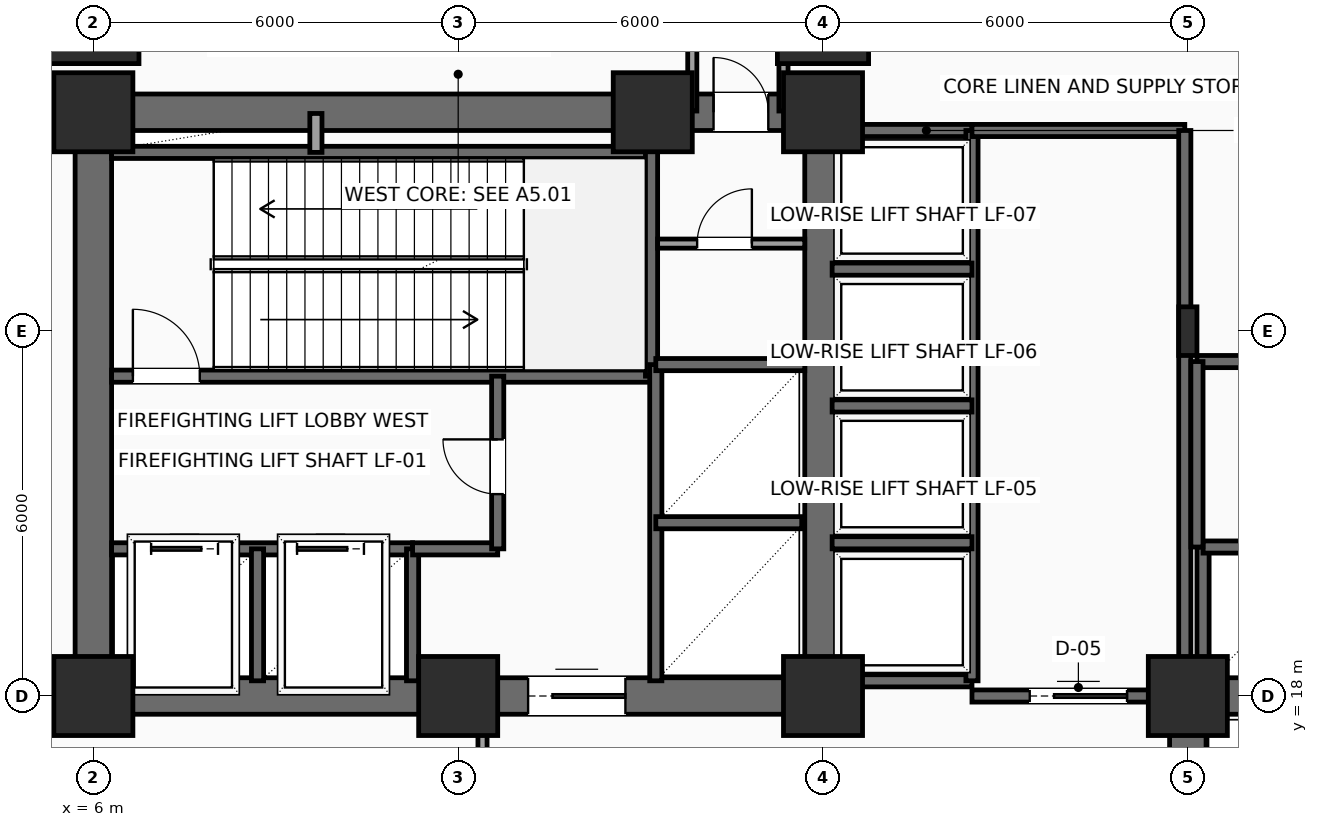
"""IFC4 building model, lengths in metres.
Left out: names, types, materials, properties, quantities, classifications, styles, units other than length and angle.
Written with IfcOpenShell. Run it as: python <this file> out.ifc"""

import sys

from ifc_helpers import new_model, si_unit, direction, frame, frame_2d, origin, origin_2d, place, context, subcontext, project, spatial, rectangle, i_section, extrude, element, fill, save


model = new_model("IFC4")
c1 = context("Model", 3, precision=1e-05, world=origin(), true_north=direction((0.0, 1.0)))
c2 = subcontext(c1, "Body", "Model", "MODEL_VIEW")
j1 = project(units=[si_unit("LENGTHUNIT", "METRE"), si_unit("PLANEANGLEUNIT", "RADIAN")], contexts=[c1])
p1 = place(None, origin())
s1 = spatial("IfcSite", under=j1, at=p1, CompositionType="ELEMENT")
p2 = place(p1, origin())
s2 = spatial("IfcBuilding", under=s1, at=p2, CompositionType="ELEMENT")
p3 = place(p2, frame((0.0, 0.0, 11.1)))
s3 = spatial("IfcBuildingStorey", under=s2, at=p3, CompositionType="ELEMENT", Elevation=11.1)
for number, where, z_axis, x_axis in (
    (1, (6.0, 18.0, 0.0), (0.0, 0.0, 1.0), (1.0, 0.0, 0.0)),
    (2, (12.0, 18.0, 0.0), (0.0, 0.0, 1.0), (1.0, 0.0, 0.0)),
    (3, (18.0, 18.0, 0.0), (0.0, 0.0, 1.0), (1.0, 0.0, 0.0)),
    (4, (6.0, 27.6, 0.0), (0.0, 0.0, 1.0), (1.0, 0.0, 0.0)),
    (5, (15.2, 27.6, 0.0), (0.0, 0.0, 1.0), (1.0, 0.0, 0.0)),
    (6, (18.0, 27.6, 0.0), (0.0, 0.0, 1.0), (1.0, 0.0, 0.0)),
    (7, (24.0, 18.0, 0.0), (0.0, 0.0, 1.0), (1.0, 0.0, 0.0)),
):
    element("IfcColumn", number, at=place(p3, frame(where, z_axis=z_axis, x_axis=x_axis)), inside=s3, PredefinedType="COLUMN", context=c2, shape_type="SweptSolid", body=[
        extrude(rectangle(XDim=1.3, YDim=1.3, at=origin_2d()), origin(), (0.0, 0.0, 1.0), 5.4),
    ])
for number, where, z_axis, x_axis in (
    (8, (6.0, 29.15, 0.0), (0.0, 0.0, 1.0), (1.0, 0.0, 0.0)),
    (9, (18.0, 29.15, 0.0), (0.0, 0.0, 1.0), (1.0, 0.0, 0.0)),
):
    element("IfcColumn", number, at=place(p3, frame(where, z_axis=z_axis, x_axis=x_axis)), inside=s3, PredefinedType="COLUMN", context=c2, shape_type="SweptSolid", body=[
        extrude(rectangle(XDim=1.5, YDim=1.5, at=origin_2d()), origin(), (0.0, 0.0, 1.0), 5.4),
    ])
p4 = place(p3, frame((24.0, 24.0, 0.0), z_axis=(0.0, 0.0, 1.0), x_axis=(1.0, 0.0, 0.0)))
e10 = element("IfcColumn", 10, at=p4, inside=s3, PredefinedType="COLUMN", context=c2, shape_type="SweptSolid", body=[
    extrude(i_section(OverallWidth=0.3, OverallDepth=0.8, WebThickness=0.018, FlangeThickness=0.033, FilletRadius=0.03, at=origin_2d()), origin(), (0.0, 0.0, 1.0), 5.4),
])
p5 = place(p3, frame((6.0, 18.0, 0.0), z_axis=(0.0, 0.0, 1.0), x_axis=(1.0, 0.0, 0.0)))
e11 = element("IfcWall", 11, at=p5, inside=s3, PredefinedType="SHEAR", context=c2, shape_type="SweptSolid", body=[
    extrude(rectangle(XDim=12.0, YDim=0.6, at=frame_2d((6.0, 0.0))), origin(), (0.0, 0.0, 1.0), 5.1),
])
p6 = place(p5, frame((7.15, 0.0, 0.0)))
e12 = element("IfcOpeningElement", 12, at=p6, cuts=e11, PredefinedType="OPENING", context=c2, shape_type="SweptSolid", body=[
    extrude(rectangle(XDim=1.6, YDim=2.3, at=frame_2d((0.8, 1.15))), frame((0.0, 0.31, 0.0), z_axis=(0.0, -1.0, 0.0), x_axis=(1.0, 0.0, 0.0)), (0.0, 0.0, 1.0), 0.62),
])
p7 = place(p3, frame((6.0, 27.6, 0.0), z_axis=(0.0, 0.0, 1.0), x_axis=(1.0, 0.0, 0.0)))
e13 = element("IfcWall", 13, at=p7, inside=s3, PredefinedType="SHEAR", context=c2, shape_type="SweptSolid", body=[
    extrude(rectangle(XDim=12.0, YDim=0.6, at=frame_2d((6.0, 0.0))), origin(), (0.0, 0.0, 1.0), 5.1),
])
p8 = place(p7, frame((10.2, 0.0, 0.0)))
e14 = element("IfcOpeningElement", 14, at=p8, cuts=e13, PredefinedType="OPENING", context=c2, shape_type="SweptSolid", body=[
    extrude(rectangle(XDim=0.9, YDim=2.15, at=frame_2d((0.45, 1.075))), frame((0.0, 0.31, 0.0), z_axis=(0.0, -1.0, 0.0), x_axis=(1.0, 0.0, 0.0)), (0.0, 0.0, 1.0), 0.62),
])
for number, where, z_axis, x_axis in (
    (15, (6.0, 18.0, 0.0), (0.0, 0.0, 1.0), (0.0, 1.0, 0.0)),
    (16, (18.0, 18.0, 0.0), (0.0, 0.0, 1.0), (0.0, 1.0, 0.0)),
    (17, (24.0, 18.0, 0.0), (0.0, 0.0, 1.0), (1.0, 0.0, 0.0)),
):
    element("IfcWall", number, at=place(p3, frame(where, z_axis=z_axis, x_axis=x_axis)), inside=s3, PredefinedType="SHEAR", context=c2, shape_type="SweptSolid", body=[
        extrude(rectangle(XDim=9.6, YDim=0.6, at=frame_2d((4.8, 0.0))), origin(), (0.0, 0.0, 1.0), 5.1),
    ])
p9 = place(p3, frame((24.0, 6.0, 0.0), z_axis=(0.0, 0.0, 1.0), x_axis=(0.0, 1.0, 0.0)))
e18 = element("IfcWall", 18, at=p9, inside=s3, PredefinedType="SHEAR", context=c2, shape_type="SweptSolid", body=[
    extrude(rectangle(XDim=12.0, YDim=0.6, at=frame_2d((6.0, 0.0))), origin(), (0.0, 0.0, 1.0), 5.1),
])
p10 = place(p9, frame((7.15, 0.0, 0.0)))
e19 = element("IfcOpeningElement", 19, at=p10, cuts=e18, PredefinedType="OPENING", context=c2, shape_type="SweptSolid", body=[
    extrude(rectangle(XDim=1.6, YDim=2.3, at=frame_2d((0.8, 1.15))), frame((0.0, 0.31, 0.0), z_axis=(0.0, -1.0, 0.0), x_axis=(1.0, 0.0, 0.0)), (0.0, 0.0, 1.0), 0.62),
])
p11 = place(p3, frame((6.3, 23.26, 0.0), z_axis=(0.0, 0.0, 1.0), x_axis=(1.0, 0.0, 0.0)))
e20 = element("IfcWall", 20, at=p11, inside=s3, PredefinedType="SHEAR", context=c2, shape_type="SweptSolid", body=[
    extrude(rectangle(XDim=8.88, YDim=0.2, at=frame_2d((4.44, 0.0))), origin(), (0.0, 0.0, 1.0), 5.1),
])
p12 = place(p11, frame((0.35, 0.0, 0.0)))
e21 = element("IfcOpeningElement", 21, at=p12, cuts=e20, PredefinedType="OPENING", context=c2, shape_type="SweptSolid", body=[
    extrude(rectangle(XDim=1.1, YDim=2.2, at=frame_2d((0.55, 1.1))), frame((0.0, 0.11, 0.0), z_axis=(0.0, -1.0, 0.0), x_axis=(1.0, 0.0, 0.0)), (0.0, 0.0, 1.0), 0.22),
])
p13 = place(p3, frame((6.3, 26.94, 0.0), z_axis=(0.0, 0.0, 1.0), x_axis=(1.0, 0.0, 0.0)))
e22 = element("IfcWall", 22, at=p13, inside=s3, PredefinedType="SHEAR", context=c2, shape_type="SweptSolid", body=[
    extrude(rectangle(XDim=8.88, YDim=0.2, at=frame_2d((4.44, 0.0))), origin(), (0.0, 0.0, 1.0), 5.1),
])
p14 = place(p3, frame((15.18, 23.26, 0.0), z_axis=(0.0, 0.0, 1.0), x_axis=(0.0, 1.0, 0.0)))
e23 = element("IfcWall", 23, at=p14, inside=s3, PredefinedType="SHEAR", context=c2, shape_type="SweptSolid", body=[
    extrude(rectangle(XDim=4.04, YDim=0.2, at=frame_2d((2.02, 0.0))), origin(), (0.0, 0.0, 1.0), 5.1),
])
p15 = place(p3, frame((6.3, 20.42, 0.0), z_axis=(0.0, 0.0, 1.0), x_axis=(1.0, 0.0, 0.0)))
e24 = element("IfcWall", 24, at=p15, inside=s3, PredefinedType="SHEAR", context=c2, shape_type="SweptSolid", body=[
    extrude(rectangle(XDim=4.95, YDim=0.2, at=frame_2d((2.475, 0.0))), origin(), (0.0, 0.0, 1.0), 5.1),
])
p16 = place(p15, frame((0.65, 0.0, 0.0)))
e25 = element("IfcOpeningElement", 25, at=p16, cuts=e24, PredefinedType="OPENING", context=c2, shape_type="SweptSolid", body=[
    extrude(rectangle(XDim=1.1, YDim=2.2, at=frame_2d((0.55, 1.1))), frame((0.0, 0.11, 0.0), z_axis=(0.0, -1.0, 0.0), x_axis=(1.0, 0.0, 0.0)), (0.0, 0.0, 1.0), 0.22),
])
p17 = place(p15, frame((3.05, 0.0, 0.0)))
e26 = element("IfcOpeningElement", 26, at=p17, cuts=e24, PredefinedType="OPENING", context=c2, shape_type="SweptSolid", body=[
    extrude(rectangle(XDim=1.1, YDim=2.2, at=frame_2d((0.55, 1.1))), frame((0.0, 0.11, 0.0), z_axis=(0.0, -1.0, 0.0), x_axis=(1.0, 0.0, 0.0)), (0.0, 0.0, 1.0), 0.22),
])
for number, where, z_axis, x_axis in (
    (27, (8.7, 18.25, 0.0), (0.0, 0.0, 1.0), (0.0, 1.0, 0.0)),
    (28, (11.25, 18.25, 0.0), (0.0, 0.0, 1.0), (0.0, 1.0, 0.0)),
):
    element("IfcWall", number, at=place(p3, frame(where, z_axis=z_axis, x_axis=x_axis)), inside=s3, PredefinedType="SHEAR", context=c2, shape_type="SweptSolid", body=[
        extrude(rectangle(XDim=2.17, YDim=0.2, at=frame_2d((1.085, 0.0))), origin(), (0.0, 0.0, 1.0), 5.1),
    ])
p18 = place(p3, frame((11.25, 20.42, 0.0), z_axis=(0.0, 0.0, 1.0), x_axis=(1.0, 0.0, 0.0)))
e29 = element("IfcWall", 29, at=p18, inside=s3, PredefinedType="SHEAR", context=c2, shape_type="SweptSolid", body=[
    extrude(rectangle(XDim=1.4, YDim=0.2, at=frame_2d((0.7, 0.0))), origin(), (0.0, 0.0, 1.0), 5.1),
])
p19 = place(p3, frame((12.65, 20.42, 0.0), z_axis=(0.0, 0.0, 1.0), x_axis=(0.0, 1.0, 0.0)))
e30 = element("IfcWall", 30, at=p19, inside=s3, PredefinedType="SHEAR", context=c2, shape_type="SweptSolid", body=[
    extrude(rectangle(XDim=2.84, YDim=0.2, at=frame_2d((1.42, 0.0))), origin(), (0.0, 0.0, 1.0), 5.1),
])
p20 = place(p19, frame((0.9, 0.0, 0.0)))
e31 = element("IfcOpeningElement", 31, at=p20, cuts=e30, PredefinedType="OPENING", context=c2, shape_type="SweptSolid", body=[
    extrude(rectangle(XDim=0.9, YDim=2.15, at=frame_2d((0.45, 1.075))), frame((0.0, 0.11, 0.0), z_axis=(0.0, -1.0, 0.0), x_axis=(1.0, 0.0, 0.0)), (0.0, 0.0, 1.0), 0.22),
])
p21 = place(p3, frame((9.66, 26.94, 0.0), z_axis=(0.0, 0.0, 1.0), x_axis=(0.0, 1.0, 0.0)))
e32 = element("IfcWall", 32, at=p21, inside=s3, PredefinedType="SOLIDWALL", context=c2, shape_type="SweptSolid", body=[
    extrude(rectangle(XDim=0.64, YDim=0.2, at=frame_2d((0.32, 0.0))), origin(), (0.0, 0.0, 1.0), 5.1),
])
p22 = place(p3, frame((15.25, 18.25, 0.0), z_axis=(0.0, 0.0, 1.0), x_axis=(0.0, 1.0, 0.0)))
e33 = element("IfcWall", 33, at=p22, inside=s3, PredefinedType="SHEAR", context=c2, shape_type="SweptSolid", body=[
    extrude(rectangle(XDim=5.2, YDim=0.2, at=frame_2d((2.6, 0.0))), origin(), (0.0, 0.0, 1.0), 5.1),
])
p23 = place(p3, frame((15.25, 20.85, 0.0), z_axis=(0.0, 0.0, 1.0), x_axis=(1.0, 0.0, 0.0)))
e34 = element("IfcWall", 34, at=p23, inside=s3, PredefinedType="SHEAR", context=c2, shape_type="SweptSolid", body=[
    extrude(rectangle(XDim=2.4, YDim=0.2, at=frame_2d((1.2, 0.0))), origin(), (0.0, 0.0, 1.0), 5.1),
])
p24 = place(p3, frame((15.25, 23.45, 0.0), z_axis=(0.0, 0.0, 1.0), x_axis=(1.0, 0.0, 0.0)))
e35 = element("IfcWall", 35, at=p24, inside=s3, PredefinedType="SHEAR", context=c2, shape_type="SweptSolid", body=[
    extrude(rectangle(XDim=2.45, YDim=0.2, at=frame_2d((1.225, 0.0))), origin(), (0.0, 0.0, 1.0), 5.1),
])
p25 = place(p3, frame((15.28, 25.44, 0.0), z_axis=(0.0, 0.0, 1.0), x_axis=(1.0, 0.0, 0.0)))
e36 = element("IfcWall", 36, at=p25, inside=s3, PredefinedType="PARTITIONING", context=c2, shape_type="SweptSolid", body=[
    extrude(rectangle(XDim=2.42, YDim=0.15, at=frame_2d((1.21, 0.0))), origin(), (0.0, 0.0, 1.0), 5.1),
])
p26 = place(p25, frame((0.65, 0.0, 0.0)))
e37 = element("IfcOpeningElement", 37, at=p26, cuts=e36, PredefinedType="OPENING", context=c2, shape_type="SweptSolid", body=[
    extrude(rectangle(XDim=0.9, YDim=2.15, at=frame_2d((0.45, 1.075))), frame((0.0, 0.085, 0.0), z_axis=(0.0, -1.0, 0.0), x_axis=(1.0, 0.0, 0.0)), (0.0, 0.0, 1.0), 0.17),
])
for number, where, z_axis, x_axis in (
    (38, (18.1, 27.3, 0.0), (0.0, 0.0, 1.0), (1.0, 0.0, 0.0)),
    (39, (18.1, 18.25, 0.0), (0.0, 0.0, 1.0), (1.0, 0.0, 0.0)),
):
    element("IfcWall", number, at=place(p3, frame(where, z_axis=z_axis, x_axis=x_axis)), inside=s3, PredefinedType="SHEAR", context=c2, shape_type="SweptSolid", body=[
        extrude(rectangle(XDim=2.35, YDim=0.2, at=frame_2d((1.175, 0.0))), origin(), (0.0, 0.0, 1.0), 5.1),
    ])
p27 = place(p3, frame((20.45, 18.25, 0.0), z_axis=(0.0, 0.0, 1.0), x_axis=(0.0, 1.0, 0.0)))
e40 = element("IfcWall", 40, at=p27, inside=s3, PredefinedType="SHEAR", context=c2, shape_type="SweptSolid", body=[
    extrude(rectangle(XDim=9.05, YDim=0.2, at=frame_2d((4.525, 0.0))), origin(), (0.0, 0.0, 1.0), 5.1),
])
for number, where, z_axis, x_axis in (
    (41, (18.15, 20.52, 0.0), (0.0, 0.0, 1.0), (1.0, 0.0, 0.0)),
    (42, (18.15, 22.77, 0.0), (0.0, 0.0, 1.0), (1.0, 0.0, 0.0)),
    (43, (18.15, 25.02, 0.0), (0.0, 0.0, 1.0), (1.0, 0.0, 0.0)),
):
    element("IfcWall", number, at=place(p3, frame(where, z_axis=z_axis, x_axis=x_axis)), inside=s3, PredefinedType="SHEAR", context=c2, shape_type="SweptSolid", body=[
        extrude(rectangle(XDim=2.3, YDim=0.2, at=frame_2d((1.15, 0.0))), origin(), (0.0, 0.0, 1.0), 5.1),
    ])
p28 = place(p3, frame((20.45, 18.0, 0.0), z_axis=(0.0, 0.0, 1.0), x_axis=(1.0, 0.0, 0.0)))
e44 = element("IfcWall", 44, at=p28, inside=s3, PredefinedType="SHEAR", context=c2, shape_type="SweptSolid", body=[
    extrude(rectangle(XDim=3.5, YDim=0.2, at=frame_2d((1.75, 0.0))), origin(), (0.0, 0.0, 1.0), 5.1),
])
p29 = place(p28, frame((0.95, 0.0, 0.0)))
e45 = element("IfcOpeningElement", 45, at=p29, cuts=e44, PredefinedType="OPENING", context=c2, shape_type="SweptSolid", body=[
    extrude(rectangle(XDim=1.6, YDim=2.3, at=frame_2d((0.8, 1.15))), frame((0.0, 0.11, 0.0), z_axis=(0.0, -1.0, 0.0), x_axis=(1.0, 0.0, 0.0)), (0.0, 0.0, 1.0), 0.22),
])
p30 = place(p3, frame((20.45, 27.3, 0.0), z_axis=(0.0, 0.0, 1.0), x_axis=(1.0, 0.0, 0.0)))
e46 = element("IfcWall", 46, at=p30, inside=s3, PredefinedType="SHEAR", context=c2, shape_type="SweptSolid", body=[
    extrude(rectangle(XDim=3.5, YDim=0.2, at=frame_2d((1.75, 0.0))), origin(), (0.0, 0.0, 1.0), 5.1),
])
p31 = place(p3, frame((23.95, 18.0, 0.0), z_axis=(0.0, 0.0, 1.0), x_axis=(0.0, 1.0, 0.0)))
e47 = element("IfcWall", 47, at=p31, inside=s3, PredefinedType="SHEAR", context=c2, shape_type="SweptSolid", body=[
    extrude(rectangle(XDim=9.3, YDim=0.2, at=frame_2d((4.65, 0.0))), origin(), (0.0, 0.0, 1.0), 5.1),
])
p32 = place(p3, frame((24.25, 18.1, 0.0), z_axis=(0.0, 0.0, 1.0), x_axis=(0.0, 1.0, 0.0)))
e48 = element("IfcWall", 48, at=p32, inside=s3, PredefinedType="SHEAR", context=c2, shape_type="SweptSolid", body=[
    extrude(rectangle(XDim=2.35, YDim=0.2, at=frame_2d((1.175, 0.0))), origin(), (0.0, 0.0, 1.0), 5.1),
])
p33 = place(p3, frame((24.25, 20.45, 0.0), z_axis=(0.0, 0.0, 1.0), x_axis=(1.0, 0.0, 0.0)))
e49 = element("IfcWall", 49, at=p33, inside=s3, PredefinedType="SHEAR", context=c2, shape_type="SweptSolid", body=[
    extrude(rectangle(XDim=9.05, YDim=0.2, at=frame_2d((4.525, 0.0))), origin(), (0.0, 0.0, 1.0), 5.1),
])
p34 = place(p3, frame((24.15, 23.5, 0.0), z_axis=(0.0, 0.0, 1.0), x_axis=(1.0, 0.0, 0.0)))
e50 = element("IfcWall", 50, at=p34, inside=s3, PredefinedType="SHEAR", context=c2, shape_type="SweptSolid", body=[
    extrude(rectangle(XDim=9.15, YDim=0.2, at=frame_2d((4.575, 0.0))), origin(), (0.0, 0.0, 1.0), 5.1),
])
p35 = place(p34, frame((1.15, 0.0, 0.0)))
e51 = element("IfcOpeningElement", 51, at=p35, cuts=e50, PredefinedType="OPENING", context=c2, shape_type="SweptSolid", body=[
    extrude(rectangle(XDim=1.6, YDim=2.3, at=frame_2d((0.8, 1.15))), frame((0.0, 0.11, 0.0), z_axis=(0.0, -1.0, 0.0), x_axis=(1.0, 0.0, 0.0)), (0.0, 0.0, 1.0), 0.22),
])
p36 = place(p3, frame((24.15, 20.45, 0.0), z_axis=(0.0, 0.0, 1.0), x_axis=(0.0, 1.0, 0.0)))
e52 = element("IfcWall", 52, at=p36, inside=s3, PredefinedType="SHEAR", context=c2, shape_type="SweptSolid", body=[
    extrude(rectangle(XDim=3.05, YDim=0.2, at=frame_2d((1.525, 0.0))), origin(), (0.0, 0.0, 1.0), 5.1),
])
p37 = place(p3, frame((12.4, 16.55, 0.0), z_axis=(0.0, 0.0, 1.0), x_axis=(0.0, 1.0, 0.0)))
e53 = element("IfcWall", 53, at=p37, inside=s3, PredefinedType="PARTITIONING", context=c2, shape_type="SweptSolid", body=[
    extrude(rectangle(XDim=1.41, YDim=0.15, at=frame_2d((0.705, 0.0))), origin(), (0.0, 0.0, 1.0), 5.1),
])
for number, where, z_axis, x_axis in (
    (54, (17.35, 30.2, 0.0), (0.0, 0.0, 1.0), (0.0, -1.0, 0.0)),
    (55, (15.85, 27.62, 0.0), (0.0, 0.0, 1.0), (0.0, 1.0, 0.0)),
):
    element("IfcWall", number, at=place(p3, frame(where, z_axis=z_axis, x_axis=x_axis)), inside=s3, PredefinedType="PARTITIONING", context=c2, shape_type="SweptSolid", body=[
        extrude(rectangle(XDim=2.58, YDim=0.15, at=frame_2d((1.29, 0.0))), origin(), (0.0, 0.0, 1.0), 5.1),
    ])
p38 = place(p6, origin())
e56 = element("IfcDoor", 56, at=p38, inside=s3, OperationType="DOUBLE_DOOR_SLIDING", PredefinedType="DOOR", context=c2, shape_type="SweptSolid", body=[
    extrude(rectangle(XDim=1.6, YDim=2.3, at=frame_2d((0.8, 1.15))), frame((0.0, 0.025, 0.0), z_axis=(0.0, -1.0, 0.0), x_axis=(1.0, 0.0, 0.0)), (0.0, 0.0, 1.0), 0.05),
])
fill(e12, e56)
p39 = place(p8, origin())
e57 = element("IfcDoor", 57, at=p39, inside=s3, OperationType="SINGLE_SWING_LEFT", PredefinedType="DOOR", context=c2, shape_type="SweptSolid", body=[
    extrude(rectangle(XDim=0.9, YDim=2.15, at=frame_2d((0.45, 1.075))), frame((0.0, 0.025, 0.0), z_axis=(0.0, -1.0, 0.0), x_axis=(1.0, 0.0, 0.0)), (0.0, 0.0, 1.0), 0.05),
])
fill(e14, e57)
p40 = place(p12, origin())
e58 = element("IfcDoor", 58, at=p40, inside=s3, OperationType="SINGLE_SWING_LEFT", PredefinedType="DOOR", context=c2, shape_type="SweptSolid", body=[
    extrude(rectangle(XDim=1.1, YDim=2.2, at=frame_2d((0.55, 1.1))), frame((0.0, 0.025, 0.0), z_axis=(0.0, -1.0, 0.0), x_axis=(1.0, 0.0, 0.0)), (0.0, 0.0, 1.0), 0.05),
])
fill(e21, e58)
p41 = place(p16, origin())
e59 = element("IfcDoor", 59, at=p41, inside=s3, OperationType="SLIDING_TO_LEFT", PredefinedType="DOOR", context=c2, shape_type="SweptSolid", body=[
    extrude(rectangle(XDim=1.1, YDim=2.2, at=frame_2d((0.55, 1.1))), frame((0.0, 0.025, 0.0), z_axis=(0.0, -1.0, 0.0), x_axis=(1.0, 0.0, 0.0)), (0.0, 0.0, 1.0), 0.05),
])
fill(e25, e59)
p42 = place(p17, origin())
e60 = element("IfcDoor", 60, at=p42, inside=s3, OperationType="SLIDING_TO_LEFT", PredefinedType="DOOR", context=c2, shape_type="SweptSolid", body=[
    extrude(rectangle(XDim=1.1, YDim=2.2, at=frame_2d((0.55, 1.1))), frame((0.0, 0.025, 0.0), z_axis=(0.0, -1.0, 0.0), x_axis=(1.0, 0.0, 0.0)), (0.0, 0.0, 1.0), 0.05),
])
fill(e26, e60)
p43 = place(p20, origin())
e61 = element("IfcDoor", 61, at=p43, inside=s3, OperationType="SINGLE_SWING_RIGHT", PredefinedType="DOOR", context=c2, shape_type="SweptSolid", body=[
    extrude(rectangle(XDim=0.9, YDim=2.15, at=frame_2d((0.45, 1.075))), frame((0.0, 0.025, 0.0), z_axis=(0.0, -1.0, 0.0), x_axis=(1.0, 0.0, 0.0)), (0.0, 0.0, 1.0), 0.05),
])
fill(e31, e61)
p44 = place(p26, origin())
e62 = element("IfcDoor", 62, at=p44, inside=s3, OperationType="SINGLE_SWING_RIGHT", PredefinedType="DOOR", context=c2, shape_type="SweptSolid", body=[
    extrude(rectangle(XDim=0.9, YDim=2.15, at=frame_2d((0.45, 1.075))), frame((0.0, 0.025, 0.0), z_axis=(0.0, -1.0, 0.0), x_axis=(1.0, 0.0, 0.0)), (0.0, 0.0, 1.0), 0.05),
])
fill(e37, e62)
p45 = place(p29, origin())
e63 = element("IfcDoor", 63, at=p45, inside=s3, OperationType="DOUBLE_DOOR_SLIDING", PredefinedType="DOOR", context=c2, shape_type="SweptSolid", body=[
    extrude(rectangle(XDim=1.6, YDim=2.3, at=frame_2d((0.8, 1.15))), frame((0.0, 0.025, 0.0), z_axis=(0.0, -1.0, 0.0), x_axis=(1.0, 0.0, 0.0)), (0.0, 0.0, 1.0), 0.05),
])
fill(e45, e63)
save(model, sys.argv[1])
